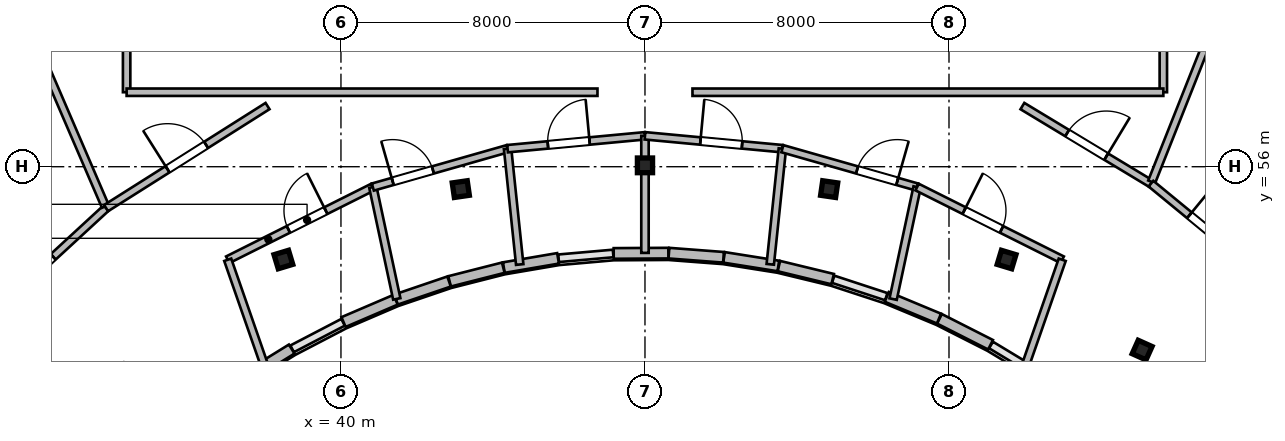
"""IFC4 building model, lengths in metres.
Left out: names, types, materials, properties, quantities, classifications, styles, units other than length and angle.
Written with IfcOpenShell. Run it as: python <this file> out.ifc"""

import sys

from ifc_helpers import new_model, si_unit, direction, frame, frame_2d, origin, origin_2d, place, context, subcontext, project, spatial, rectangle, i_section, extrude, source, transform, mapped, element, fill, save


model = new_model("IFC4")
c1 = context("Model", 3, precision=1e-05, world=origin(), true_north=direction((0.0, 1.0)))
c2 = subcontext(c1, "Body", "Model", "MODEL_VIEW")
j1 = project(units=[si_unit("LENGTHUNIT", "METRE"), si_unit("PLANEANGLEUNIT", "RADIAN")], contexts=[c1])
p1 = place(None, origin())
s1 = spatial("IfcSite", under=j1, at=p1, CompositionType="ELEMENT")
p2 = place(p1, origin())
s2 = spatial("IfcBuilding", under=s1, at=p2, CompositionType="ELEMENT")
p3 = place(p2, frame((0.0, 0.0, 287.4)))
s3 = spatial("IfcBuildingStorey", under=s2, at=p3, CompositionType="ELEMENT", Elevation=287.4)
m1 = source(origin(), c2, "Body", "SweptSolid", [
    extrude(i_section(OverallWidth=0.399, OverallDepth=0.387, WebThickness=0.021, FlangeThickness=0.033, at=origin_2d()), origin(), (0.0, 0.0, 1.0), 3.9),
])
for number, where, z_axis, x_axis in (
    (1, (38.485, 53.558, 0.0), (0.0, 0.0, 1.0), (-0.289, 0.957, 0.0)),
    (2, (43.154, 55.411, 0.0), (0.0, 0.0, 1.0), (-0.143, 0.99, 0.0)),
    (3, (48.0, 56.036, 0.0), (0.0, 0.0, 1.0), (0.0, 1.0, 0.0)),
    (4, (52.846, 55.411, 0.0), (0.0, 0.0, 1.0), (0.143, 0.99, 0.0)),
    (5, (57.515, 53.558, 0.0), (0.0, 0.0, 1.0), (0.289, 0.957, 0.0)),
    (6, (61.082, 51.175, 0.0), (0.0, 0.0, 1.0), (0.409, 0.912, 0.0)),
):
    element("IfcColumn", number, at=place(p3, frame(where, z_axis=z_axis, x_axis=x_axis)), inside=s3, PredefinedType="COLUMN", context=c2, shape_type="MappedRepresentation", body=[
        mapped(m1, transform((0.0, 0.0, 0.0), scale=1.0)),
    ])
m2 = source(origin(), c2, "Body", "SweptSolid", [
    extrude(rectangle(XDim=1.509, YDim=0.28, at=frame_2d((0.754, 0.0))), origin(), (0.0, 0.0, 1.0), 3.64),
])
p4 = place(p3, frame((57.094, 51.315, 0.0), z_axis=(0.0, 0.0, 1.0), x_axis=(-0.89169189228, 0.452642871635, 0.0)))
e7 = element("IfcWall", 7, at=p4, inside=s3, PredefinedType="SOLIDWALL", context=c2, shape_type="MappedRepresentation", body=[
    mapped(m2, transform((0.0, 0.0, 0.0), scale=1.0)),
])
m3 = source(origin(), c2, "Body", "SweptSolid", [
    extrude(rectangle(XDim=1.488, YDim=0.28, at=frame_2d((0.744, 0.0))), origin(), (0.0, 0.0, 1.0), 3.64),
])
p5 = place(p3, frame((55.736, 52.004, 0.0), z_axis=(0.0, 0.0, 1.0), x_axis=(-0.923261314935, 0.384172545017, 0.0)))
e8 = element("IfcWall", 8, at=p5, inside=s3, PredefinedType="SOLIDWALL", context=c2, shape_type="MappedRepresentation", body=[
    mapped(m3, transform((0.0, 0.0, 0.0), scale=1.0)),
])
m4 = source(origin(), c2, "Body", "SweptSolid", [
    extrude(rectangle(XDim=1.457, YDim=0.28, at=frame_2d((0.728, 0.0))), origin(), (0.0, 0.0, 1.0), 3.64),
])
p6 = place(p3, frame((52.939, 53.042, 0.0), z_axis=(0.0, 0.0, 1.0), x_axis=(-0.97187219902, 0.23550887196, 0.0)))
e9 = element("IfcWall", 9, at=p6, inside=s3, PredefinedType="SOLIDWALL", context=c2, shape_type="MappedRepresentation", body=[
    mapped(m4, transform((0.0, 0.0, 0.0), scale=1.0)),
])
m5 = source(origin(), c2, "Body", "SweptSolid", [
    extrude(rectangle(XDim=1.446, YDim=0.28, at=frame_2d((0.723, 0.0))), origin(), (0.0, 0.0, 1.0), 3.64),
])
p7 = place(p3, frame((51.509, 53.388, 0.0), z_axis=(0.0, 0.0, 1.0), x_axis=(-0.987650460941, 0.156673440642, 0.0)))
e10 = element("IfcWall", 10, at=p7, inside=s3, PredefinedType="SOLIDWALL", context=c2, shape_type="MappedRepresentation", body=[
    mapped(m5, transform((0.0, 0.0, 0.0), scale=1.0)),
])
m6 = source(origin(), c2, "Body", "SweptSolid", [
    extrude(rectangle(XDim=1.44, YDim=0.28, at=frame_2d((0.72, 0.0))), origin(), (0.0, 0.0, 1.0), 3.64),
])
p8 = place(p3, frame((50.066, 53.616, 0.0), z_axis=(0.0, 0.0, 1.0), x_axis=(-0.997124860794, 0.075776064736, 0.0)))
e11 = element("IfcWall", 11, at=p8, inside=s3, PredefinedType="SOLIDWALL", context=c2, shape_type="MappedRepresentation", body=[
    mapped(m6, transform((0.0, 0.0, 0.0), scale=1.0)),
])
m7 = source(origin(), c2, "Body", "SweptSolid", [
    extrude(rectangle(XDim=1.438, YDim=0.28, at=frame_2d((0.719, 0.0))), origin(), (0.0, 0.0, 1.0), 3.64),
])
p9 = place(p3, frame((48.615, 53.726, 0.0), z_axis=(0.0, 0.0, 1.0), x_axis=(-0.999982357135, -0.005940153174, 0.0)))
e12 = element("IfcWall", 12, at=p9, inside=s3, PredefinedType="SOLIDWALL", context=c2, shape_type="MappedRepresentation", body=[
    mapped(m7, transform((0.0, 0.0, 0.0), scale=1.0)),
])
m8 = source(origin(), c2, "Body", "SweptSolid", [
    extrude(rectangle(XDim=1.447, YDim=0.28, at=frame_2d((0.724, 0.0))), origin(), (0.0, 0.0, 1.0), 3.64),
])
p10 = place(p3, frame((45.713, 53.589, 0.0), z_axis=(0.0, 0.0, 1.0), x_axis=(-0.985785525921, -0.168008621461, 0.0)))
e13 = element("IfcWall", 13, at=p10, inside=s3, PredefinedType="SOLIDWALL", context=c2, shape_type="MappedRepresentation", body=[
    mapped(m8, transform((0.0, 0.0, 0.0), scale=1.0)),
])
m9 = source(origin(), c2, "Body", "SweptSolid", [
    extrude(rectangle(XDim=1.458, YDim=0.28, at=frame_2d((0.729, 0.0))), origin(), (0.0, 0.0, 1.0), 3.64),
])
p11 = place(p3, frame((44.271, 53.343, 0.0), z_axis=(0.0, 0.0, 1.0), x_axis=(-0.969109544438, -0.246630677083, 0.0)))
e14 = element("IfcWall", 14, at=p11, inside=s3, PredefinedType="SOLIDWALL", context=c2, shape_type="MappedRepresentation", body=[
    mapped(m9, transform((0.0, 0.0, 0.0), scale=1.0)),
])
m10 = source(origin(), c2, "Body", "SweptSolid", [
    extrude(rectangle(XDim=1.473, YDim=0.28, at=frame_2d((0.736, 0.0))), origin(), (0.0, 0.0, 1.0), 3.64),
])
p12 = place(p3, frame((42.845, 52.979, 0.0), z_axis=(0.0, 0.0, 1.0), x_axis=(-0.946641296917, -0.322289086026, 0.0)))
e15 = element("IfcWall", 15, at=p12, inside=s3, PredefinedType="SOLIDWALL", context=c2, shape_type="MappedRepresentation", body=[
    mapped(m10, transform((0.0, 0.0, 0.0), scale=1.0)),
])
m11 = source(origin(), c2, "Body", "SweptSolid", [
    extrude(rectangle(XDim=1.49, YDim=0.28, at=frame_2d((0.745, 0.0))), origin(), (0.0, 0.0, 1.0), 3.64),
])
p13 = place(p3, frame((41.438, 52.5, 0.0), z_axis=(0.0, 0.0, 1.0), x_axis=(-0.919009427656, -0.394235553799, 0.0)))
e16 = element("IfcWall", 16, at=p13, inside=s3, PredefinedType="SOLIDWALL", context=c2, shape_type="MappedRepresentation", body=[
    mapped(m11, transform((0.0, 0.0, 0.0), scale=1.0)),
])
m12 = source(origin(), c2, "Body", "SweptSolid", [
    extrude(rectangle(XDim=1.535, YDim=0.28, at=frame_2d((0.768, 0.0))), origin(), (0.0, 0.0, 1.0), 3.64),
])
p14 = place(p3, frame((38.704, 51.201, 0.0), z_axis=(0.0, 0.0, 1.0), x_axis=(-0.850756173541, -0.525560589449, 0.0)))
e17 = element("IfcWall", 17, at=p14, inside=s3, PredefinedType="SOLIDWALL", context=c2, shape_type="MappedRepresentation", body=[
    mapped(m12, transform((0.0, 0.0, 0.0), scale=1.0)),
])
m13 = source(origin(), c2, "Body", "SweptSolid", [
    extrude(rectangle(XDim=4.271, YDim=0.195, at=frame_2d((2.135, 0.0))), origin(), (0.0, 0.0, 1.0), 3.64),
])
p15 = place(p3, frame((37.021, 53.552, 0.0), z_axis=(0.0, 0.0, 1.0), x_axis=(0.894061035522, 0.447945158207, 0.0)))
e18 = element("IfcWall", 18, at=p15, inside=s3, PredefinedType="PARTITIONING", context=c2, shape_type="MappedRepresentation", body=[
    mapped(m13, transform((0.0, 0.0, 0.0), scale=1.0)),
])
p16 = place(p15, frame((1.785, 0.0, 0.0)))
e19 = element("IfcOpeningElement", 19, at=p16, cuts=e18, PredefinedType="OPENING", context=c2, shape_type="SweptSolid", body=[
    extrude(rectangle(XDim=1.1, YDim=2.15, at=frame_2d((0.55, 1.075))), frame((0.0, 0.107, 0.0), z_axis=(0.0, -1.0, 0.0), x_axis=(1.0, 0.0, 0.0)), (0.0, 0.0, 1.0), 0.215),
])
m14 = source(origin(), c2, "Body", "SweptSolid", [
    extrude(rectangle(XDim=2.944, YDim=0.195, at=frame_2d((1.472, 0.0))), origin(), (0.0, 0.0, 1.0), 3.64),
])
p17 = place(p3, frame((37.988, 50.771, 0.0), z_axis=(0.0, 0.0, 1.0), x_axis=(-0.328565655286, 0.944481132774, 0.0)))
e20 = element("IfcWall", 20, at=p17, inside=s3, PredefinedType="PARTITIONING", context=c2, shape_type="MappedRepresentation", body=[
    mapped(m14, transform((0.0, 0.0, 0.0), scale=1.0)),
])
m15 = source(origin(), c2, "Body", "SweptSolid", [
    extrude(rectangle(XDim=3.01, YDim=0.195, at=frame_2d((1.505, 0.0))), origin(), (0.0, 0.0, 1.0), 3.64),
])
p18 = place(p3, frame((41.469, 52.521, 0.0), z_axis=(0.0, 0.0, 1.0), x_axis=(-0.209279797988, 0.977855800287, 0.0)))
e21 = element("IfcWall", 21, at=p18, inside=s3, PredefinedType="PARTITIONING", context=c2, shape_type="MappedRepresentation", body=[
    mapped(m15, transform((0.0, 0.0, 0.0), scale=1.0)),
])
m16 = source(origin(), c2, "Body", "SweptSolid", [
    extrude(rectangle(XDim=3.687, YDim=0.195, at=frame_2d((1.843, 0.0))), origin(), (0.0, 0.0, 1.0), 3.64),
])
p19 = place(p3, frame((40.839, 55.465, 0.0), z_axis=(0.0, 0.0, 1.0), x_axis=(0.961753532248, 0.27391630694, 0.0)))
e22 = element("IfcWall", 22, at=p19, inside=s3, PredefinedType="PARTITIONING", context=c2, shape_type="MappedRepresentation", body=[
    mapped(m16, transform((0.0, 0.0, 0.0), scale=1.0)),
])
p20 = place(p19, frame((0.543, 0.0, 0.0)))
e23 = element("IfcOpeningElement", 23, at=p20, cuts=e22, PredefinedType="OPENING", context=c2, shape_type="SweptSolid", body=[
    extrude(rectangle(XDim=1.1, YDim=2.15, at=frame_2d((0.55, 1.075))), frame((0.0, 0.107, 0.0), z_axis=(0.0, -1.0, 0.0), x_axis=(1.0, 0.0, 0.0)), (0.0, 0.0, 1.0), 0.215),
])
m17 = source(origin(), c2, "Body", "SweptSolid", [
    extrude(rectangle(XDim=3.063, YDim=0.195, at=frame_2d((1.532, 0.0))), origin(), (0.0, 0.0, 1.0), 3.64),
])
p21 = place(p3, frame((44.704, 53.427, 0.0), z_axis=(0.0, 0.0, 1.0), x_axis=(-0.104315578516, 0.994544247421, 0.0)))
e24 = element("IfcWall", 24, at=p21, inside=s3, PredefinedType="PARTITIONING", context=c2, shape_type="MappedRepresentation", body=[
    mapped(m17, transform((0.0, 0.0, 0.0), scale=1.0)),
])
m18 = source(origin(), c2, "Body", "SweptSolid", [
    extrude(rectangle(XDim=3.632, YDim=0.195, at=frame_2d((1.816, 0.0))), origin(), (0.0, 0.0, 1.0), 3.64),
])
p22 = place(p3, frame((44.384, 56.474, 0.0), z_axis=(0.0, 0.0, 1.0), x_axis=(0.99563695898, 0.093311552942, 0.0)))
e25 = element("IfcWall", 25, at=p22, inside=s3, PredefinedType="PARTITIONING", context=c2, shape_type="MappedRepresentation", body=[
    mapped(m18, transform((0.0, 0.0, 0.0), scale=1.0)),
])
p23 = place(p22, frame((1.066, 0.0, 0.0)))
e26 = element("IfcOpeningElement", 26, at=p23, cuts=e25, PredefinedType="OPENING", context=c2, shape_type="SweptSolid", body=[
    extrude(rectangle(XDim=1.1, YDim=2.15, at=frame_2d((0.55, 1.075))), frame((0.0, 0.107, 0.0), z_axis=(0.0, -1.0, 0.0), x_axis=(1.0, 0.0, 0.0)), (0.0, 0.0, 1.0), 0.215),
])
m19 = source(origin(), c2, "Body", "SweptSolid", [
    extrude(rectangle(XDim=3.081, YDim=0.195, at=frame_2d((1.54, 0.0))), origin(), (0.0, 0.0, 1.0), 3.314),
])
p24 = place(p3, frame((48.0, 53.733, 0.0), z_axis=(0.0, 0.0, 1.0), x_axis=(0.0, 1.0, 0.0)))
e27 = element("IfcWall", 27, at=p24, inside=s3, PredefinedType="PARTITIONING", context=c2, shape_type="MappedRepresentation", body=[
    mapped(m19, transform((0.0, 0.0, 0.0), scale=1.0)),
])
p25 = place(p3, frame((48.0, 56.813, 0.0), z_axis=(0.0, 0.0, 1.0), x_axis=(0.99563695898, -0.093311552942, 0.0)))
e28 = element("IfcWall", 28, at=p25, inside=s3, PredefinedType="PARTITIONING", context=c2, shape_type="MappedRepresentation", body=[
    mapped(m18, transform((0.0, 0.0, 0.0), scale=1.0)),
])
p26 = place(p25, frame((1.466, 0.0, 0.0)))
e29 = element("IfcOpeningElement", 29, at=p26, cuts=e28, PredefinedType="OPENING", context=c2, shape_type="SweptSolid", body=[
    extrude(rectangle(XDim=1.1, YDim=2.15, at=frame_2d((0.55, 1.075))), frame((0.0, 0.107, 0.0), z_axis=(0.0, -1.0, 0.0), x_axis=(1.0, 0.0, 0.0)), (0.0, 0.0, 1.0), 0.215),
])
m20 = source(origin(), c2, "Body", "SweptSolid", [
    extrude(rectangle(XDim=3.059, YDim=0.195, at=frame_2d((1.53, 0.0))), origin(), (0.0, 0.0, 1.0), 3.64),
])
p27 = place(p3, frame((51.297, 53.432, 0.0), z_axis=(0.0, 0.0, 1.0), x_axis=(0.10430673596, 0.994545174858, 0.0)))
e30 = element("IfcWall", 30, at=p27, inside=s3, PredefinedType="PARTITIONING", context=c2, shape_type="MappedRepresentation", body=[
    mapped(m20, transform((0.0, 0.0, 0.0), scale=1.0)),
])
p28 = place(p3, frame((51.616, 56.474, 0.0), z_axis=(0.0, 0.0, 1.0), x_axis=(0.961753532248, -0.27391630694, 0.0)))
e31 = element("IfcWall", 31, at=p28, inside=s3, PredefinedType="PARTITIONING", context=c2, shape_type="MappedRepresentation", body=[
    mapped(m16, transform((0.0, 0.0, 0.0), scale=1.0)),
])
p29 = place(p28, frame((2.043, 0.0, 0.0)))
e32 = element("IfcOpeningElement", 32, at=p29, cuts=e31, PredefinedType="OPENING", context=c2, shape_type="SweptSolid", body=[
    extrude(rectangle(XDim=1.1, YDim=2.15, at=frame_2d((0.55, 1.075))), frame((0.0, 0.107, 0.0), z_axis=(0.0, -1.0, 0.0), x_axis=(1.0, 0.0, 0.0)), (0.0, 0.0, 1.0), 0.215),
])
m21 = source(origin(), c2, "Body", "SweptSolid", [
    extrude(rectangle(XDim=3.015, YDim=0.195, at=frame_2d((1.507, 0.0))), origin(), (0.0, 0.0, 1.0), 3.64),
])
p30 = place(p3, frame((54.53, 52.517, 0.0), z_axis=(0.0, 0.0, 1.0), x_axis=(0.209258086484, 0.977860446711, 0.0)))
e33 = element("IfcWall", 33, at=p30, inside=s3, PredefinedType="PARTITIONING", context=c2, shape_type="MappedRepresentation", body=[
    mapped(m21, transform((0.0, 0.0, 0.0), scale=1.0)),
])
p31 = place(p3, frame((55.161, 55.465, 0.0), z_axis=(0.0, 0.0, 1.0), x_axis=(0.894061035522, -0.447945158207, 0.0)))
e34 = element("IfcWall", 34, at=p31, inside=s3, PredefinedType="PARTITIONING", context=c2, shape_type="MappedRepresentation", body=[
    mapped(m13, transform((0.0, 0.0, 0.0), scale=1.0)),
])
p32 = place(p31, frame((1.385, 0.0, 0.0)))
e35 = element("IfcOpeningElement", 35, at=p32, cuts=e34, PredefinedType="OPENING", context=c2, shape_type="SweptSolid", body=[
    extrude(rectangle(XDim=1.1, YDim=2.15, at=frame_2d((0.55, 1.075))), frame((0.0, 0.107, 0.0), z_axis=(0.0, -1.0, 0.0), x_axis=(1.0, 0.0, 0.0)), (0.0, 0.0, 1.0), 0.215),
])
m22 = source(origin(), c2, "Body", "SweptSolid", [
    extrude(rectangle(XDim=2.942, YDim=0.195, at=frame_2d((1.471, 0.0))), origin(), (0.0, 0.0, 1.0), 3.64),
])
p33 = place(p3, frame((58.013, 50.773, 0.0), z_axis=(0.0, 0.0, 1.0), x_axis=(0.328623620494, 0.944460965871, 0.0)))
e36 = element("IfcWall", 36, at=p33, inside=s3, PredefinedType="PARTITIONING", context=c2, shape_type="MappedRepresentation", body=[
    mapped(m22, transform((0.0, 0.0, 0.0), scale=1.0)),
])
m23 = source(origin(), c2, "Body", "SweptSolid", [
    extrude(rectangle(XDim=4.986, YDim=0.195, at=frame_2d((2.493, 0.0))), origin(), (0.0, 0.0, 1.0), 3.64),
])
p34 = place(p3, frame((30.153, 51.533, 0.0), z_axis=(0.0, 0.0, 1.0), x_axis=(0.735595190169, 0.677421372707, 0.0)))
e37 = element("IfcWall", 37, at=p34, inside=s3, PredefinedType="PARTITIONING", context=c2, shape_type="MappedRepresentation", body=[
    mapped(m23, transform((0.0, 0.0, 0.0), scale=1.0)),
])
p35 = place(p34, frame((1.893, 0.0, 0.0)))
e38 = element("IfcOpeningElement", 38, at=p35, cuts=e37, PredefinedType="OPENING", context=c2, shape_type="SweptSolid", body=[
    extrude(rectangle(XDim=1.2, YDim=2.15, at=frame_2d((0.6, 1.075))), frame((0.0, 0.107, 0.0), z_axis=(0.0, -1.0, 0.0), x_axis=(1.0, 0.0, 0.0)), (0.0, 0.0, 1.0), 0.215),
])
m24 = source(origin(), c2, "Body", "SweptSolid", [
    extrude(rectangle(XDim=17.556, YDim=0.195, at=frame_2d((8.778, 0.0))), origin(), (0.0, 0.0, 1.0), 3.64),
])
p36 = place(p3, frame((33.8, 54.958, 0.0), z_axis=(0.0, 0.0, 1.0), x_axis=(-0.395687598313, 0.918385172213, 0.0)))
e39 = element("IfcWall", 39, at=p36, inside=s3, PredefinedType="PARTITIONING", context=c2, shape_type="MappedRepresentation", body=[
    mapped(m24, transform((0.0, 0.0, 0.0), scale=1.0)),
])
m25 = source(origin(), c2, "Body", "SweptSolid", [
    extrude(rectangle(XDim=5.025, YDim=0.195, at=frame_2d((2.513, 0.0))), origin(), (0.0, 0.0, 1.0), 3.64),
])
p37 = place(p3, frame((33.82, 54.911, 0.0), z_axis=(0.0, 0.0, 1.0), x_axis=(0.84532378062, 0.534254345717, 0.0)))
e40 = element("IfcWall", 40, at=p37, inside=s3, PredefinedType="PARTITIONING", context=c2, shape_type="MappedRepresentation", body=[
    mapped(m25, transform((0.0, 0.0, 0.0), scale=1.0)),
])
p38 = place(p37, frame((1.913, 0.0, 0.0)))
e41 = element("IfcOpeningElement", 41, at=p38, cuts=e40, PredefinedType="OPENING", context=c2, shape_type="SweptSolid", body=[
    extrude(rectangle(XDim=1.2, YDim=2.15, at=frame_2d((0.6, 1.075))), frame((0.0, 0.107, 0.0), z_axis=(0.0, -1.0, 0.0), x_axis=(1.0, 0.0, 0.0)), (0.0, 0.0, 1.0), 0.215),
])
m26 = source(origin(), c2, "Body", "SweptSolid", [
    extrude(rectangle(XDim=17.681, YDim=0.195, at=frame_2d((8.84, 0.0))), origin(), (0.0, 0.0, 1.0), 3.64),
])
p39 = place(p3, frame((34.36, 57.96, 0.0), z_axis=(0.0, 0.0, 1.0), x_axis=(0.0, 1.0, 0.0)))
e42 = element("IfcWall", 42, at=p39, inside=s3, PredefinedType="PARTITIONING", context=c2, shape_type="MappedRepresentation", body=[
    mapped(m26, transform((0.0, 0.0, 0.0), scale=1.0)),
])
m27 = source(origin(), c2, "Body", "SweptSolid", [
    extrude(rectangle(XDim=3.951, YDim=0.195, at=frame_2d((1.975, 0.0))), origin(), (0.0, 0.0, 1.0), 3.64),
])
p40 = place(p3, frame((57.932, 57.596, 0.0), z_axis=(0.0, 0.0, 1.0), x_axis=(0.856137696849, -0.51674775668, 0.0)))
e43 = element("IfcWall", 43, at=p40, inside=s3, PredefinedType="PARTITIONING", context=c2, shape_type="MappedRepresentation", body=[
    mapped(m27, transform((0.0, 0.0, 0.0), scale=1.0)),
])
p41 = place(p40, frame((1.375, 0.0, 0.0)))
e44 = element("IfcOpeningElement", 44, at=p41, cuts=e43, PredefinedType="OPENING", context=c2, shape_type="SweptSolid", body=[
    extrude(rectangle(XDim=1.2, YDim=2.15, at=frame_2d((0.6, 1.075))), frame((0.0, 0.107, 0.0), z_axis=(0.0, -1.0, 0.0), x_axis=(1.0, 0.0, 0.0)), (0.0, 0.0, 1.0), 0.215),
])
m28 = source(origin(), c2, "Body", "SweptSolid", [
    extrude(rectangle(XDim=17.664, YDim=0.195, at=frame_2d((8.832, 0.0))), origin(), (0.0, 0.0, 1.0), 3.64),
])
p42 = place(p3, frame((61.333, 55.602, 0.0), z_axis=(0.0, 0.0, 1.0), x_axis=(0.368827513738, 0.929497856431, 0.0)))
e45 = element("IfcWall", 45, at=p42, inside=s3, PredefinedType="PARTITIONING", context=c2, shape_type="MappedRepresentation", body=[
    mapped(m28, transform((0.0, 0.0, 0.0), scale=1.0)),
])
m29 = source(origin(), c2, "Body", "SweptSolid", [
    extrude(rectangle(XDim=3.82, YDim=0.195, at=frame_2d((1.91, 0.0))), origin(), (0.0, 0.0, 1.0), 3.64),
])
p43 = place(p3, frame((61.314, 55.554, 0.0), z_axis=(0.0, 0.0, 1.0), x_axis=(0.772805728445, -0.63464266015, 0.0)))
e46 = element("IfcWall", 46, at=p43, inside=s3, PredefinedType="PARTITIONING", context=c2, shape_type="MappedRepresentation", body=[
    mapped(m29, transform((0.0, 0.0, 0.0), scale=1.0)),
])
p44 = place(p43, frame((1.31, 0.0, 0.0)))
e47 = element("IfcOpeningElement", 47, at=p44, cuts=e46, PredefinedType="OPENING", context=c2, shape_type="SweptSolid", body=[
    extrude(rectangle(XDim=1.2, YDim=2.15, at=frame_2d((0.6, 1.075))), frame((0.0, 0.107, 0.0), z_axis=(0.0, -1.0, 0.0), x_axis=(1.0, 0.0, 0.0)), (0.0, 0.0, 1.0), 0.215),
])
m30 = source(origin(), c2, "Body", "SweptSolid", [
    extrude(rectangle(XDim=17.693, YDim=0.195, at=frame_2d((8.847, 0.0))), origin(), (0.0, 0.0, 1.0), 3.64),
])
p45 = place(p3, frame((61.64, 57.96, 0.0), z_axis=(0.0, 0.0, 1.0), x_axis=(0.0, 1.0, 0.0)))
e48 = element("IfcWall", 48, at=p45, inside=s3, PredefinedType="PARTITIONING", context=c2, shape_type="MappedRepresentation", body=[
    mapped(m30, transform((0.0, 0.0, 0.0), scale=1.0)),
])
m31 = source(origin(), c2, "Body", "SweptSolid", [
    extrude(rectangle(XDim=12.39, YDim=0.195, at=frame_2d((6.195, 0.0))), origin(), (0.0, 0.0, 1.0), 3.64),
])
for number, where, z_axis, x_axis in (
    (49, (34.36, 57.96, 0.0), (0.0, 0.0, 1.0), (1.0, 0.0, 0.0)),
    (50, (49.25, 57.96, 0.0), (0.0, 0.0, 1.0), (1.0, 0.0, 0.0)),
):
    element("IfcWall", number, at=place(p3, frame(where, z_axis=z_axis, x_axis=x_axis)), inside=s3, PredefinedType="PARTITIONING", context=c2, shape_type="MappedRepresentation", body=[
        mapped(m31, transform((0.0, 0.0, 0.0), scale=1.0)),
    ])
m32 = source(origin(), c2, "Body", "SweptSolid", [
    extrude(rectangle(XDim=1.1, YDim=2.15, at=frame_2d((0.55, 1.075))), frame((0.0, 0.025, 0.0), z_axis=(0.0, -1.0, 0.0), x_axis=(1.0, 0.0, 0.0)), (0.0, 0.0, 1.0), 0.05),
])
p46 = place(p16, origin())
e51 = element("IfcDoor", 51, at=p46, inside=s3, OperationType="SINGLE_SWING_RIGHT", PredefinedType="DOOR", context=c2, shape_type="MappedRepresentation", body=[
    mapped(m32, transform((0.0, 0.0, 0.0), scale=1.0)),
])
fill(e19, e51)
p47 = place(p20, origin())
e52 = element("IfcDoor", 52, at=p47, inside=s3, OperationType="SINGLE_SWING_LEFT", PredefinedType="DOOR", context=c2, shape_type="MappedRepresentation", body=[
    mapped(m32, transform((0.0, 0.0, 0.0), scale=1.0)),
])
fill(e23, e52)
p48 = place(p23, origin())
e53 = element("IfcDoor", 53, at=p48, inside=s3, OperationType="SINGLE_SWING_RIGHT", PredefinedType="DOOR", context=c2, shape_type="MappedRepresentation", body=[
    mapped(m32, transform((0.0, 0.0, 0.0), scale=1.0)),
])
fill(e26, e53)
p49 = place(p26, origin())
e54 = element("IfcDoor", 54, at=p49, inside=s3, OperationType="SINGLE_SWING_LEFT", PredefinedType="DOOR", context=c2, shape_type="MappedRepresentation", body=[
    mapped(m32, transform((0.0, 0.0, 0.0), scale=1.0)),
])
fill(e29, e54)
p50 = place(p29, origin())
e55 = element("IfcDoor", 55, at=p50, inside=s3, OperationType="SINGLE_SWING_RIGHT", PredefinedType="DOOR", context=c2, shape_type="MappedRepresentation", body=[
    mapped(m32, transform((0.0, 0.0, 0.0), scale=1.0)),
])
fill(e32, e55)
p51 = place(p32, origin())
e56 = element("IfcDoor", 56, at=p51, inside=s3, OperationType="SINGLE_SWING_LEFT", PredefinedType="DOOR", context=c2, shape_type="MappedRepresentation", body=[
    mapped(m32, transform((0.0, 0.0, 0.0), scale=1.0)),
])
fill(e35, e56)
m33 = source(origin(), c2, "Body", "SweptSolid", [
    extrude(rectangle(XDim=1.2, YDim=2.15, at=frame_2d((0.6, 1.075))), frame((0.0, 0.025, 0.0), z_axis=(0.0, -1.0, 0.0), x_axis=(1.0, 0.0, 0.0)), (0.0, 0.0, 1.0), 0.05),
])
p52 = place(p35, origin())
e57 = element("IfcDoor", 57, at=p52, inside=s3, OperationType="SINGLE_SWING_RIGHT", PredefinedType="DOOR", context=c2, shape_type="MappedRepresentation", body=[
    mapped(m33, transform((0.0, 0.0, 0.0), scale=1.0)),
])
fill(e38, e57)
p53 = place(p38, origin())
e58 = element("IfcDoor", 58, at=p53, inside=s3, OperationType="SINGLE_SWING_LEFT", PredefinedType="DOOR", context=c2, shape_type="MappedRepresentation", body=[
    mapped(m33, transform((0.0, 0.0, 0.0), scale=1.0)),
])
fill(e41, e58)
p54 = place(p41, origin())
e59 = element("IfcDoor", 59, at=p54, inside=s3, OperationType="SINGLE_SWING_RIGHT", PredefinedType="DOOR", context=c2, shape_type="MappedRepresentation", body=[
    mapped(m33, transform((0.0, 0.0, 0.0), scale=1.0)),
])
fill(e44, e59)
p55 = place(p44, origin())
e60 = element("IfcDoor", 60, at=p55, inside=s3, OperationType="SINGLE_SWING_LEFT", PredefinedType="DOOR", context=c2, shape_type="MappedRepresentation", body=[
    mapped(m33, transform((0.0, 0.0, 0.0), scale=1.0)),
])
fill(e47, e60)
save(model, sys.argv[1])
